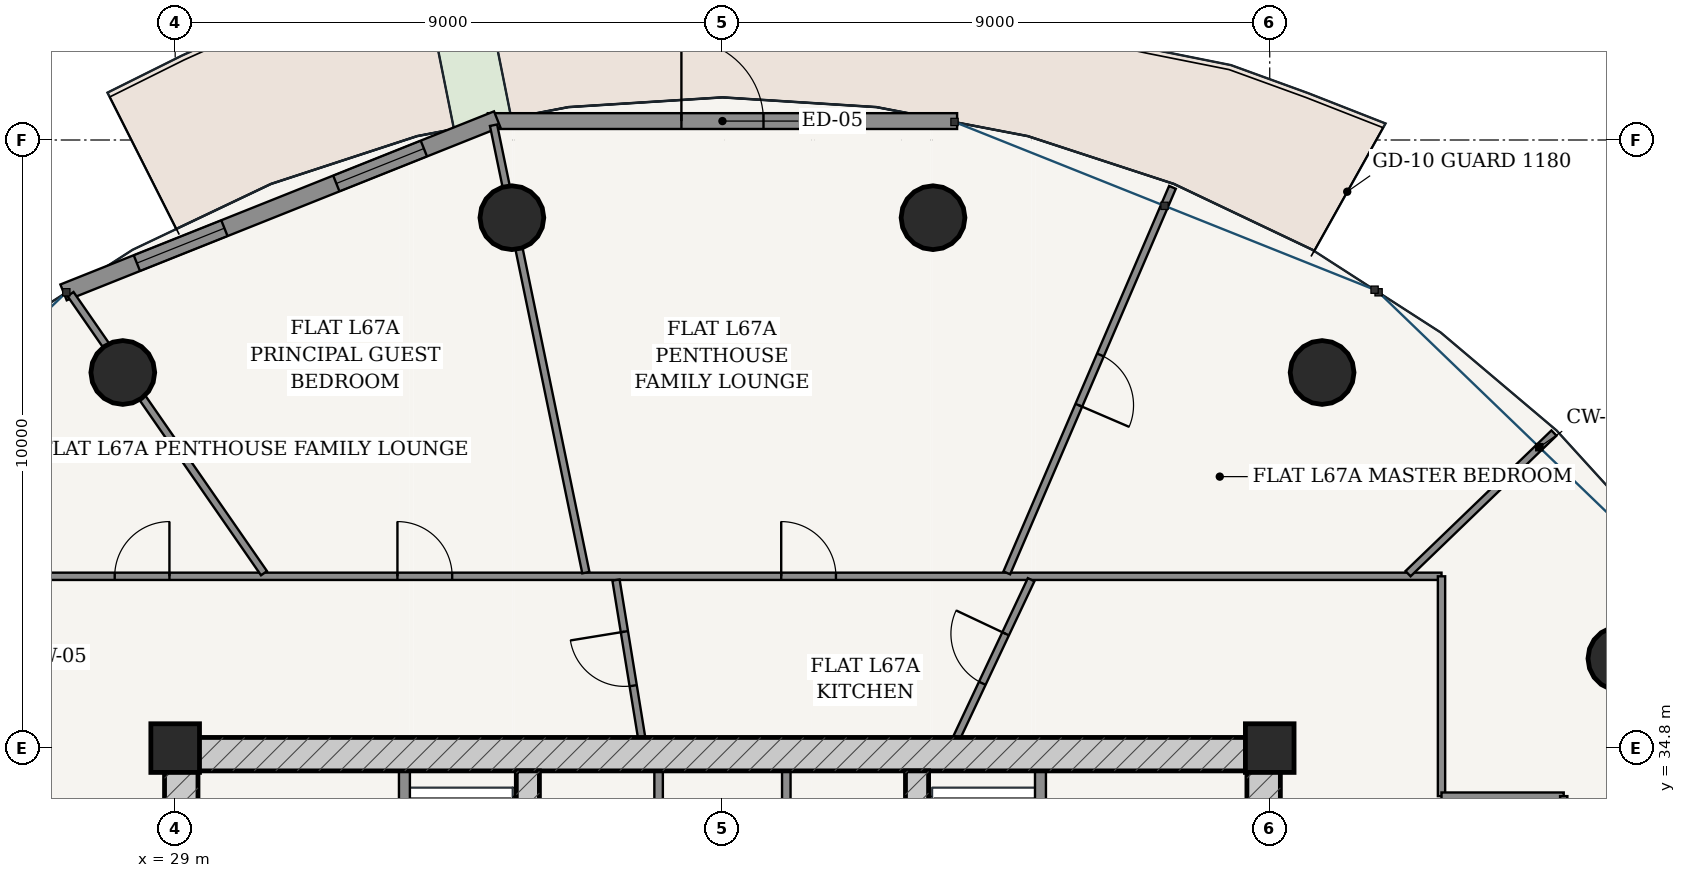
"""IFC4 building model, lengths in metres.
Left out: names, types, materials, properties, quantities, classifications, styles, units other than length and angle.
Written with IfcOpenShell. Run it as: python <this file> out.ifc"""

import sys

from ifc_helpers import new_model, si_unit, direction, frame, frame_2d, origin, origin_2d, place, context, subcontext, project, spatial, rectangle, hollow_circle, extrude, source, transform, mapped, element, fill, save


model = new_model("IFC4")
c1 = context("Model", 3, precision=1e-05, world=origin(), true_north=direction((-0.2419218956, 0.970295726276)))
c2 = subcontext(c1, "Body", "Model", "MODEL_VIEW")
j1 = project(units=[si_unit("LENGTHUNIT", "METRE"), si_unit("PLANEANGLEUNIT", "RADIAN")], contexts=[c1])
p1 = place(None, origin())
s1 = spatial("IfcSite", under=j1, at=p1, CompositionType="ELEMENT")
p2 = place(p1, origin())
s2 = spatial("IfcBuilding", under=s1, at=p2, CompositionType="ELEMENT")
p3 = place(p2, frame((0.0, 0.0, 255.7)))
s3 = spatial("IfcBuildingStorey", under=s2, at=p3, CompositionType="ELEMENT", Elevation=255.7)
for number, where, z_axis, x_axis in (
    (1, (47.0, 34.8, 0.0), (0.0, 0.0, 1.0), (1.0, 0.0, 0.0)),
    (2, (29.0, 34.8, 0.0), (0.0, 0.0, 1.0), (1.0, 0.0, 0.0)),
):
    element("IfcColumn", number, at=place(p3, frame(where, z_axis=z_axis, x_axis=x_axis)), inside=s3, PredefinedType="COLUMN", context=c2, shape_type="SweptSolid", body=[
        extrude(rectangle(XDim=0.8, YDim=0.8, at=origin_2d()), origin(), (0.0, 0.0, 1.0), 3.75),
    ])
p4 = place(p3, frame((28.825, 34.7, 0.0), z_axis=(0.0, 0.0, 1.0), x_axis=(1.0, 0.0, 0.0)))
e3 = element("IfcWall", 3, at=p4, inside=s3, PredefinedType="SHEAR", context=c2, shape_type="SweptSolid", body=[
    extrude(rectangle(XDim=18.35, YDim=0.55, at=frame_2d((9.175, 0.0))), origin(), (0.0, 0.0, 1.0), 3.49),
])
p5 = place(p3, frame((29.1, 19.175, 0.0), z_axis=(0.0, 0.0, 1.0), x_axis=(0.0, 1.0, 0.0)))
e4 = element("IfcWall", 4, at=p5, inside=s3, PredefinedType="SHEAR", context=c2, shape_type="SweptSolid", body=[
    extrude(rectangle(XDim=15.25, YDim=0.55, at=frame_2d((7.625, 0.0))), origin(), (0.0, 0.0, 1.0), 3.49),
])
p6 = place(p5, frame((9.875, 0.0, 0.0)))
e5 = element("IfcOpeningElement", 5, at=p6, cuts=e4, PredefinedType="OPENING", context=c2, shape_type="SweptSolid", body=[
    extrude(rectangle(XDim=1.5, YDim=2.2, at=frame_2d((0.75, 1.1))), frame((0.0, 0.285, 0.0), z_axis=(0.0, -1.0, 0.0), x_axis=(1.0, 0.0, 0.0)), (0.0, 0.0, 1.0), 0.57),
])
p7 = place(p3, frame((46.9, 19.175, 0.0), z_axis=(0.0, 0.0, 1.0), x_axis=(0.0, 1.0, 0.0)))
e6 = element("IfcWall", 6, at=p7, inside=s3, PredefinedType="SHEAR", context=c2, shape_type="SweptSolid", body=[
    extrude(rectangle(XDim=15.25, YDim=0.55, at=frame_2d((7.625, 0.0))), origin(), (0.0, 0.0, 1.0), 3.49),
])
p8 = place(p7, frame((9.875, 0.0, 0.0)))
e7 = element("IfcOpeningElement", 7, at=p8, cuts=e6, PredefinedType="OPENING", context=c2, shape_type="SweptSolid", body=[
    extrude(rectangle(XDim=1.5, YDim=2.2, at=frame_2d((0.75, 1.1))), frame((0.0, 0.285, 0.0), z_axis=(0.0, -1.0, 0.0), x_axis=(1.0, 0.0, 0.0)), (0.0, 0.0, 1.0), 0.57),
])
p9 = place(p3, frame((34.8, 19.175, 0.0), z_axis=(0.0, 0.0, 1.0), x_axis=(0.0, 1.0, 0.0)))
e8 = element("IfcWall", 8, at=p9, inside=s3, PredefinedType="SHEAR", context=c2, shape_type="SweptSolid", body=[
    extrude(rectangle(XDim=15.25, YDim=0.38, at=frame_2d((7.625, 0.0))), origin(), (0.0, 0.0, 1.0), 3.49),
])
p10 = place(p9, frame((7.8, 0.0, 0.0)))
e9 = element("IfcOpeningElement", 9, at=p10, cuts=e8, PredefinedType="OPENING", context=c2, shape_type="SweptSolid", body=[
    extrude(rectangle(XDim=1.05, YDim=2.15, at=frame_2d((0.525, 1.075))), frame((0.0, 0.2, 0.0), z_axis=(0.0, -1.0, 0.0), x_axis=(1.0, 0.0, 0.0)), (0.0, 0.0, 1.0), 0.4),
])
p11 = place(p3, frame((41.2, 19.175, 0.0), z_axis=(0.0, 0.0, 1.0), x_axis=(0.0, 1.0, 0.0)))
e10 = element("IfcWall", 10, at=p11, inside=s3, PredefinedType="SHEAR", context=c2, shape_type="SweptSolid", body=[
    extrude(rectangle(XDim=15.25, YDim=0.38, at=frame_2d((7.625, 0.0))), origin(), (0.0, 0.0, 1.0), 3.49),
])
p12 = place(p11, frame((7.8, 0.0, 0.0)))
e11 = element("IfcOpeningElement", 11, at=p12, cuts=e10, PredefinedType="OPENING", context=c2, shape_type="SweptSolid", body=[
    extrude(rectangle(XDim=1.05, YDim=2.15, at=frame_2d((0.525, 1.075))), frame((0.0, 0.2, 0.0), z_axis=(0.0, -1.0, 0.0), x_axis=(1.0, 0.0, 0.0)), (0.0, 0.0, 1.0), 0.4),
])
for number, where, z_axis, x_axis in (
    (12, (52.759, 36.272, 0.0), (0.0, 0.0, 1.0), (1.0, 0.0, 0.0)),
    (13, (47.861, 40.977, 0.0), (0.0, 0.0, 1.0), (1.0, 0.0, 0.0)),
    (14, (41.463, 43.522, 0.0), (0.0, 0.0, 1.0), (1.0, 0.0, 0.0)),
    (15, (34.537, 43.522, 0.0), (0.0, 0.0, 1.0), (1.0, 0.0, 0.0)),
    (16, (28.139, 40.977, 0.0), (0.0, 0.0, 1.0), (1.0, 0.0, 0.0)),
):
    element("IfcColumn", number, at=place(p3, frame(where, z_axis=z_axis, x_axis=x_axis)), inside=s3, PredefinedType="COLUMN", context=c2, shape_type="SweptSolid", body=[
        extrude(hollow_circle(Radius=0.525, WallThickness=0.035, at=origin_2d()), origin(), (0.0, 0.0, 1.0), 3.75),
    ])
p13 = place(p3, frame((41.859, 45.111, 0.0), z_axis=(0.0, 0.0, 1.0), x_axis=(-1.0, 0.0, 0.0)))
e17 = element("IfcWall", 17, at=p13, inside=s3, PredefinedType="SOLIDWALL", context=c2, shape_type="SweptSolid", body=[
    extrude(rectangle(XDim=7.718, YDim=0.26, at=frame_2d((3.859, 0.0))), origin(), (0.0, 0.0, 1.0), 3.49),
])
p14 = place(p13, frame((3.184, 0.0, 0.0)))
e18 = element("IfcOpeningElement", 18, at=p14, cuts=e17, PredefinedType="OPENING", context=c2, shape_type="SweptSolid", body=[
    extrude(rectangle(XDim=1.35, YDim=2.2, at=frame_2d((0.675, 1.1))), frame((0.0, 0.14, 0.0), z_axis=(0.0, -1.0, 0.0), x_axis=(1.0, 0.0, 0.0)), (0.0, 0.0, 1.0), 0.28),
])
p15 = place(p3, frame((34.295, 45.141, 0.0), z_axis=(0.0, 0.0, 1.0), x_axis=(-0.928724272392, -0.370771123296, 0.0)))
e19 = element("IfcWall", 19, at=p15, inside=s3, PredefinedType="SOLIDWALL", context=c2, shape_type="SweptSolid", body=[
    extrude(rectangle(XDim=7.678, YDim=0.28, at=frame_2d((3.839, 0.0))), origin(), (0.0, 0.0, 1.0), 3.49),
])
p16 = place(p15, frame((1.298, 0.0, 0.85)))
e20 = element("IfcOpeningElement", 20, at=p16, cuts=e19, PredefinedType="OPENING", context=c2, shape_type="SweptSolid", body=[
    extrude(rectangle(XDim=1.55, YDim=1.95, at=frame_2d((0.775, 0.975))), frame((0.0, 0.15, 0.0), z_axis=(0.0, -1.0, 0.0), x_axis=(1.0, 0.0, 0.0)), (0.0, 0.0, 1.0), 0.3),
])
p17 = place(p15, frame((4.83, 0.0, 0.85)))
e21 = element("IfcOpeningElement", 21, at=p17, cuts=e19, PredefinedType="OPENING", context=c2, shape_type="SweptSolid", body=[
    extrude(rectangle(XDim=1.55, YDim=1.95, at=frame_2d((0.775, 0.975))), frame((0.0, 0.15, 0.0), z_axis=(0.0, -1.0, 0.0), x_axis=(1.0, 0.0, 0.0)), (0.0, 0.0, 1.0), 0.3),
])
p18 = place(p3, frame((32.77, 28.52, 0.0), z_axis=(0.0, 0.0, 1.0), x_axis=(0.0, 1.0, 0.0)))
e22 = element("IfcWall", 22, at=p18, inside=s3, PredefinedType="PARTITIONING", context=c2, shape_type="SweptSolid", body=[
    extrude(rectangle(XDim=5.905, YDim=0.18, at=frame_2d((2.953, 0.0))), origin(), (0.0, 0.0, 1.0), 3.49),
])
p19 = place(p18, frame((3.655, 0.0, 0.0)))
e23 = element("IfcOpeningElement", 23, at=p19, cuts=e22, PredefinedType="OPENING", context=c2, shape_type="SweptSolid", body=[
    extrude(rectangle(XDim=1.15, YDim=2.2, at=frame_2d((0.575, 1.1))), frame((0.0, 0.1, 0.0), z_axis=(0.0, -1.0, 0.0), x_axis=(1.0, 0.0, 0.0)), (0.0, 0.0, 1.0), 0.2),
])
p20 = place(p18, frame((0.73, 0.0, 0.0)))
e24 = element("IfcOpeningElement", 24, at=p20, cuts=e22, PredefinedType="OPENING", context=c2, shape_type="SweptSolid", body=[
    extrude(rectangle(XDim=1.2, YDim=2.25, at=frame_2d((0.6, 1.125))), frame((0.0, 0.1, 0.0), z_axis=(0.0, -1.0, 0.0), x_axis=(1.0, 0.0, 0.0)), (0.0, 0.0, 1.0), 0.2),
])
p21 = place(p3, frame((43.23, 28.52, 0.0), z_axis=(0.0, 0.0, 1.0), x_axis=(0.0, 1.0, 0.0)))
e25 = element("IfcWall", 25, at=p21, inside=s3, PredefinedType="PARTITIONING", context=c2, shape_type="SweptSolid", body=[
    extrude(rectangle(XDim=5.905, YDim=0.18, at=frame_2d((2.953, 0.0))), origin(), (0.0, 0.0, 1.0), 3.49),
])
p22 = place(p21, frame((0.905, 0.0, 0.0)))
e26 = element("IfcOpeningElement", 26, at=p22, cuts=e25, PredefinedType="OPENING", context=c2, shape_type="SweptSolid", body=[
    extrude(rectangle(XDim=0.85, YDim=2.1, at=frame_2d((0.425, 1.05))), frame((0.0, 0.1, 0.0), z_axis=(0.0, -1.0, 0.0), x_axis=(1.0, 0.0, 0.0)), (0.0, 0.0, 1.0), 0.2),
])
p23 = place(p21, frame((3.655, 0.0, 0.0)))
e27 = element("IfcOpeningElement", 27, at=p23, cuts=e25, PredefinedType="OPENING", context=c2, shape_type="SweptSolid", body=[
    extrude(rectangle(XDim=1.15, YDim=2.2, at=frame_2d((0.575, 1.1))), frame((0.0, 0.1, 0.0), z_axis=(0.0, -1.0, 0.0), x_axis=(1.0, 0.0, 0.0)), (0.0, 0.0, 1.0), 0.2),
])
for number, where, z_axis, x_axis in (
    (28, (36.95, 28.56, 0.0), (0.0, 0.0, 1.0), (0.0, 1.0, 0.0)),
    (29, (39.05, 28.56, 0.0), (0.0, 0.0, 1.0), (0.0, 1.0, 0.0)),
):
    element("IfcWall", number, at=place(p3, frame(where, z_axis=z_axis, x_axis=x_axis)), inside=s3, PredefinedType="PARTITIONING", context=c2, shape_type="SweptSolid", body=[
        extrude(rectangle(XDim=5.865, YDim=0.14, at=frame_2d((2.933, 0.0))), origin(), (0.0, 0.0, 1.0), 3.49),
    ])
p24 = place(p3, frame((26.175, 37.625, 0.0), z_axis=(0.0, 0.0, 1.0), x_axis=(1.0, 0.0, 0.0)))
e30 = element("IfcWall", 30, at=p24, inside=s3, PredefinedType="PARTITIONING", context=c2, shape_type="SweptSolid", body=[
    extrude(rectangle(XDim=23.65, YDim=0.12, at=frame_2d((11.825, 0.0))), origin(), (0.0, 0.0, 1.0), 3.015),
])
p25 = place(p24, frame((12.791, 0.0, 0.0)))
e31 = element("IfcOpeningElement", 31, at=p25, cuts=e30, PredefinedType="OPENING", context=c2, shape_type="SweptSolid", body=[
    extrude(rectangle(XDim=0.9, YDim=2.15, at=frame_2d((0.45, 1.075))), frame((0.0, 0.07, 0.0), z_axis=(0.0, -1.0, 0.0), x_axis=(1.0, 0.0, 0.0)), (0.0, 0.0, 1.0), 0.14),
])
p26 = place(p24, frame((6.48, 0.0, 0.0)))
e32 = element("IfcOpeningElement", 32, at=p26, cuts=e30, PredefinedType="OPENING", context=c2, shape_type="SweptSolid", body=[
    extrude(rectangle(XDim=0.9, YDim=2.15, at=frame_2d((0.45, 1.075))), frame((0.0, 0.07, 0.0), z_axis=(0.0, -1.0, 0.0), x_axis=(1.0, 0.0, 0.0)), (0.0, 0.0, 1.0), 0.14),
])
p27 = place(p24, frame((1.831, 0.0, 0.0)))
e33 = element("IfcOpeningElement", 33, at=p27, cuts=e30, PredefinedType="OPENING", context=c2, shape_type="SweptSolid", body=[
    extrude(rectangle(XDim=0.9, YDim=2.15, at=frame_2d((0.45, 1.075))), frame((0.0, 0.07, 0.0), z_axis=(0.0, -1.0, 0.0), x_axis=(1.0, 0.0, 0.0)), (0.0, 0.0, 1.0), 0.14),
])
p28 = place(p3, frame((49.825, 37.625, 0.0), z_axis=(0.0, 0.0, 1.0), x_axis=(0.0, -1.0, 0.0)))
e34 = element("IfcWall", 34, at=p28, inside=s3, PredefinedType="PARTITIONING", context=c2, shape_type="SweptSolid", body=[
    extrude(rectangle(XDim=3.615, YDim=0.12, at=frame_2d((1.808, 0.0))), origin(), (0.0, 0.0, 1.0), 3.015),
])
p29 = place(p3, frame((49.825, 34.01, 0.0), z_axis=(0.0, 0.0, 1.0), x_axis=(1.0, 0.0, 0.0)))
e35 = element("IfcWall", 35, at=p29, inside=s3, PredefinedType="PARTITIONING", context=c2, shape_type="SweptSolid", body=[
    extrude(rectangle(XDim=2.01, YDim=0.12, at=frame_2d((1.005, 0.0))), origin(), (0.0, 0.0, 1.0), 3.209),
])
p30 = place(p3, frame((51.835, 34.01, 0.0), z_axis=(0.0, 0.0, 1.0), x_axis=(0.0, -1.0, 0.0)))
e36 = element("IfcWall", 36, at=p30, inside=s3, PredefinedType="PARTITIONING", context=c2, shape_type="SweptSolid", body=[
    extrude(rectangle(XDim=12.632, YDim=0.12, at=frame_2d((6.316, 0.0))), origin(), (0.0, 0.0, 1.0), 3.015),
])
p31 = place(p30, frame((1.57, 0.0, 0.0)))
e37 = element("IfcOpeningElement", 37, at=p31, cuts=e36, PredefinedType="OPENING", context=c2, shape_type="SweptSolid", body=[
    extrude(rectangle(XDim=0.9, YDim=2.15, at=frame_2d((0.45, 1.075))), frame((0.0, 0.07, 0.0), z_axis=(0.0, -1.0, 0.0), x_axis=(1.0, 0.0, 0.0)), (0.0, 0.0, 1.0), 0.14),
])
p32 = place(p3, frame((49.275, 37.668, 0.0), z_axis=(0.0, 0.0, 1.0), x_axis=(0.719954096891, 0.694021684366, 0.0)))
e38 = element("IfcWall", 38, at=p32, inside=s3, PredefinedType="PARTITIONING", context=c2, shape_type="SweptSolid", body=[
    extrude(rectangle(XDim=3.333, YDim=0.12, at=frame_2d((1.667, 0.0))), origin(), (0.0, 0.0, 1.0), 3.121),
])
p33 = place(p3, frame((42.676, 37.682, 0.0), z_axis=(0.0, 0.0, 1.0), x_axis=(0.394777489933, 0.918776759307, 0.0)))
e39 = element("IfcWall", 39, at=p33, inside=s3, PredefinedType="PARTITIONING", context=c2, shape_type="SweptSolid", body=[
    extrude(rectangle(XDim=6.9, YDim=0.12, at=frame_2d((3.45, 0.0))), origin(), (0.0, 0.0, 1.0), 3.121),
])
p34 = place(p33, frame((3.0, 0.0, 0.0)))
e40 = element("IfcOpeningElement", 40, at=p34, cuts=e39, PredefinedType="OPENING", context=c2, shape_type="SweptSolid", body=[
    extrude(rectangle(XDim=0.9, YDim=2.15, at=frame_2d((0.45, 1.075))), frame((0.0, 0.07, 0.0), z_axis=(0.0, -1.0, 0.0), x_axis=(1.0, 0.0, 0.0)), (0.0, 0.0, 1.0), 0.14),
])
p35 = place(p3, frame((35.754, 37.686, 0.0), z_axis=(0.0, 0.0, 1.0), x_axis=(-0.202105877204, 0.979363678313, 0.0)))
e41 = element("IfcWall", 41, at=p35, inside=s3, PredefinedType="PARTITIONING", context=c2, shape_type="SweptSolid", body=[
    extrude(rectangle(XDim=7.512, YDim=0.12, at=frame_2d((3.756, 0.0))), origin(), (0.0, 0.0, 1.0), 3.015),
])
p36 = place(p3, frame((30.461, 37.676, 0.0), z_axis=(0.0, 0.0, 1.0), x_axis=(-0.569689482466, 0.821860020665, 0.0)))
e42 = element("IfcWall", 42, at=p36, inside=s3, PredefinedType="PARTITIONING", context=c2, shape_type="SweptSolid", body=[
    extrude(rectangle(XDim=5.585, YDim=0.12, at=frame_2d((2.792, 0.0))), origin(), (0.0, 0.0, 1.0), 3.015),
])
p37 = place(p3, frame((41.854, 34.977, 0.0), z_axis=(0.0, 0.0, 1.0), x_axis=(0.42640827804, 0.904530806783, 0.0)))
e43 = element("IfcWall", 43, at=p37, inside=s3, PredefinedType="PARTITIONING", context=c2, shape_type="SweptSolid", body=[
    extrude(rectangle(XDim=2.866, YDim=0.12, at=frame_2d((1.433, 0.0))), origin(), (0.0, 0.0, 1.0), 3.49),
])
p38 = place(p37, frame((0.983, 0.0, 0.0)))
e44 = element("IfcOpeningElement", 44, at=p38, cuts=e43, PredefinedType="OPENING", context=c2, shape_type="SweptSolid", body=[
    extrude(rectangle(XDim=0.9, YDim=2.15, at=frame_2d((0.45, 1.075))), frame((0.0, 0.07, 0.0), z_axis=(0.0, -1.0, 0.0), x_axis=(1.0, 0.0, 0.0)), (0.0, 0.0, 1.0), 0.14),
])
p39 = place(p3, frame((36.67, 34.977, 0.0), z_axis=(0.0, 0.0, 1.0), x_axis=(-0.160605953374, 0.98701860557, 0.0)))
e45 = element("IfcWall", 45, at=p39, inside=s3, PredefinedType="PARTITIONING", context=c2, shape_type="SweptSolid", body=[
    extrude(rectangle(XDim=2.621, YDim=0.12, at=frame_2d((1.31, 0.0))), origin(), (0.0, 0.0, 1.0), 2.575),
])
p40 = place(p39, frame((0.86, 0.0, 0.0)))
e46 = element("IfcOpeningElement", 46, at=p40, cuts=e45, PredefinedType="OPENING", context=c2, shape_type="SweptSolid", body=[
    extrude(rectangle(XDim=0.9, YDim=2.15, at=frame_2d((0.45, 1.075))), frame((0.0, 0.07, 0.0), z_axis=(0.0, -1.0, 0.0), x_axis=(1.0, 0.0, 0.0)), (0.0, 0.0, 1.0), 0.14),
])
m1 = source(origin(), c2, "Body", "SweptSolid", [
    extrude(rectangle(XDim=1.35, YDim=2.2, at=frame_2d((0.675, 1.1))), frame((0.0, 0.025, 0.0), z_axis=(0.0, -1.0, 0.0), x_axis=(1.0, 0.0, 0.0)), (0.0, 0.0, 1.0), 0.05),
])
p41 = place(p14, frame((1.35, 0.0, 0.0), z_axis=(0.0, 0.0, 1.0), x_axis=(-1.0, 0.0, 0.0)))
e47 = element("IfcDoor", 47, at=p41, inside=s3, OperationType="SINGLE_SWING_LEFT", PredefinedType="DOOR", context=c2, shape_type="MappedRepresentation", body=[
    mapped(m1, transform((0.0, 0.0, 0.0), scale=1.0)),
])
fill(e18, e47)
m2 = source(origin(), c2, "Body", "SweptSolid", [
    extrude(rectangle(XDim=1.55, YDim=1.95, at=frame_2d((0.775, 0.975))), frame((0.0, 0.03, 0.0), z_axis=(0.0, -1.0, 0.0), x_axis=(1.0, 0.0, 0.0)), (0.0, 0.0, 1.0), 0.06),
])
p42 = place(p16, origin())
e48 = element("IfcWindow", 48, at=p42, inside=s3, PartitioningType="SINGLE_PANEL", PredefinedType="WINDOW", context=c2, shape_type="MappedRepresentation", body=[
    mapped(m2, transform((0.0, 0.0, 0.0), scale=1.0)),
])
fill(e20, e48)
p43 = place(p17, origin())
e49 = element("IfcWindow", 49, at=p43, inside=s3, PartitioningType="SINGLE_PANEL", PredefinedType="WINDOW", context=c2, shape_type="MappedRepresentation", body=[
    mapped(m2, transform((0.0, 0.0, 0.0), scale=1.0)),
])
fill(e21, e49)
m3 = source(origin(), c2, "Body", "SweptSolid", [
    extrude(rectangle(XDim=0.9, YDim=2.15, at=frame_2d((0.45, 1.075))), frame((0.0, 0.025, 0.0), z_axis=(0.0, -1.0, 0.0), x_axis=(1.0, 0.0, 0.0)), (0.0, 0.0, 1.0), 0.05),
])
p44 = place(p38, origin())
e50 = element("IfcDoor", 50, at=p44, inside=s3, OperationType="SINGLE_SWING_RIGHT", PredefinedType="DOOR", context=c2, shape_type="MappedRepresentation", body=[
    mapped(m3, transform((0.0, 0.0, 0.0), scale=1.0)),
])
fill(e44, e50)
p45 = place(p25, origin())
e51 = element("IfcDoor", 51, at=p45, inside=s3, OperationType="SINGLE_SWING_LEFT", PredefinedType="DOOR", context=c2, shape_type="MappedRepresentation", body=[
    mapped(m3, transform((0.0, 0.0, 0.0), scale=1.0)),
])
fill(e31, e51)
p46 = place(p40, origin())
e52 = element("IfcDoor", 52, at=p46, inside=s3, OperationType="SINGLE_SWING_RIGHT", PredefinedType="DOOR", context=c2, shape_type="MappedRepresentation", body=[
    mapped(m3, transform((0.0, 0.0, 0.0), scale=1.0)),
])
fill(e46, e52)
p47 = place(p34, frame((0.9, 0.0, 0.0), z_axis=(0.0, 0.0, 1.0), x_axis=(-1.0, 0.0, 0.0)))
e53 = element("IfcDoor", 53, at=p47, inside=s3, OperationType="SINGLE_SWING_RIGHT", PredefinedType="DOOR", context=c2, shape_type="MappedRepresentation", body=[
    mapped(m3, transform((0.0, 0.0, 0.0), scale=1.0)),
])
fill(e40, e53)
p48 = place(p26, origin())
e54 = element("IfcDoor", 54, at=p48, inside=s3, OperationType="SINGLE_SWING_LEFT", PredefinedType="DOOR", context=c2, shape_type="MappedRepresentation", body=[
    mapped(m3, transform((0.0, 0.0, 0.0), scale=1.0)),
])
fill(e32, e54)
p49 = place(p27, origin())
e55 = element("IfcDoor", 55, at=p49, inside=s3, OperationType="SINGLE_SWING_RIGHT", PredefinedType="DOOR", context=c2, shape_type="MappedRepresentation", body=[
    mapped(m3, transform((0.0, 0.0, 0.0), scale=1.0)),
])
fill(e33, e55)
save(model, sys.argv[1])
